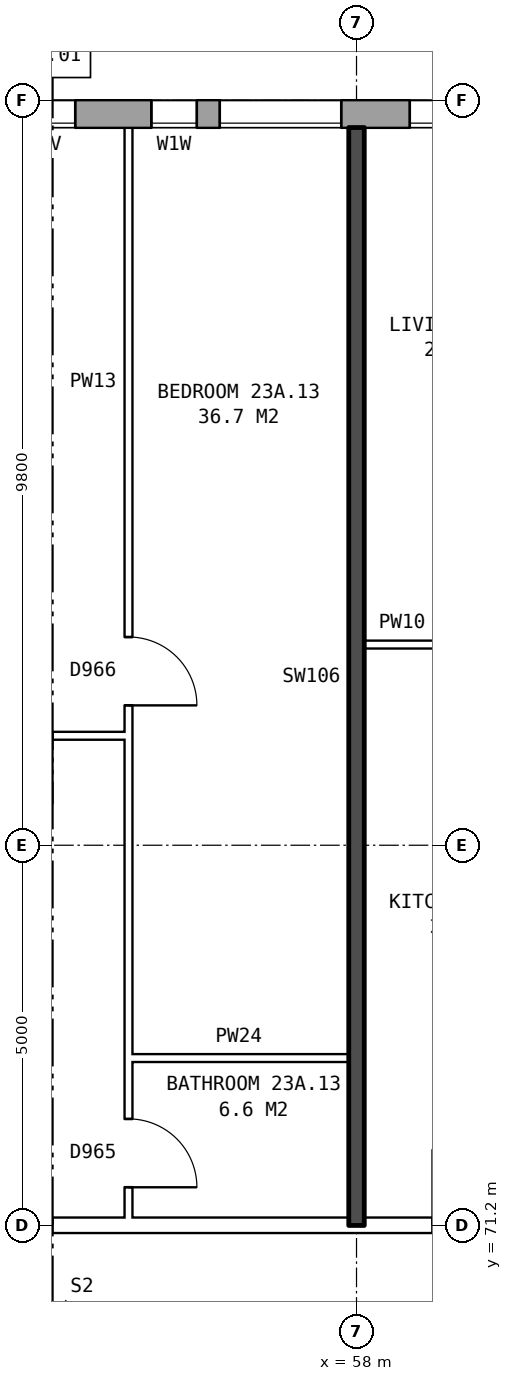
"""IFC4 building model, lengths in metres.
Left out: names, types, materials, properties, quantities, classifications, styles, units other than length and angle.
Written with IfcOpenShell. Run it as: python <this file> out.ifc"""

import sys

from ifc_helpers import new_model, si_unit, direction, frame, frame_2d, origin, place, context, subcontext, project, spatial, rectangle, extrude, element, fill, save


model = new_model("IFC4")
c1 = context("Model", 3, precision=1e-05, world=origin(), true_north=direction((0.0, 1.0)))
c2 = subcontext(c1, "Body", "Model", "MODEL_VIEW")
j1 = project(units=[si_unit("LENGTHUNIT", "METRE"), si_unit("PLANEANGLEUNIT", "RADIAN")], contexts=[c1])
p1 = place(None, origin())
s1 = spatial("IfcSite", under=j1, at=p1, CompositionType="ELEMENT")
p2 = place(p1, origin())
s2 = spatial("IfcBuilding", under=s1, at=p2, CompositionType="ELEMENT")
p3 = place(p2, frame((0.0, 0.0, 84.0)))
s3 = spatial("IfcBuildingStorey", under=s2, at=p3, CompositionType="ELEMENT", Elevation=84.0)
p4 = place(p3, frame((72.925, 85.82, 0.0), z_axis=(0.0, 0.0, 1.0), x_axis=(-1.0, 0.0, 0.0)))
e1 = element("IfcWall", 1, at=p4, inside=s3, PredefinedType="STANDARD", context=c2, shape_type="SweptSolid", body=[
    extrude(rectangle(XDim=46.601, YDim=0.36, at=frame_2d((23.3, 0.0))), origin(), (0.0, 0.0, 1.0), 2.85),
])
p5 = place(p4, frame((0.625, 0.0, 0.8)))
e2 = element("IfcOpeningElement", 2, at=p5, cuts=e1, PredefinedType="OPENING", context=c2, shape_type="SweptSolid", body=[
    extrude(rectangle(XDim=1.6, YDim=1.8, at=frame_2d((0.8, 0.9))), frame((0.0, 0.19, 0.0), z_axis=(0.0, -1.0, 0.0), x_axis=(1.0, 0.0, 0.0)), (0.0, 0.0, 1.0), 0.38),
])
p6 = place(p4, frame((3.625, 0.0, 0.8)))
e3 = element("IfcOpeningElement", 3, at=p6, cuts=e1, PredefinedType="OPENING", context=c2, shape_type="SweptSolid", body=[
    extrude(rectangle(XDim=1.6, YDim=1.8, at=frame_2d((0.8, 0.9))), frame((0.0, 0.19, 0.0), z_axis=(0.0, -1.0, 0.0), x_axis=(1.0, 0.0, 0.0)), (0.0, 0.0, 1.0), 0.38),
])
p7 = place(p4, frame((6.625, 0.0, 0.8)))
e4 = element("IfcOpeningElement", 4, at=p7, cuts=e1, PredefinedType="OPENING", context=c2, shape_type="SweptSolid", body=[
    extrude(rectangle(XDim=1.6, YDim=1.8, at=frame_2d((0.8, 0.9))), frame((0.0, 0.19, 0.0), z_axis=(0.0, -1.0, 0.0), x_axis=(1.0, 0.0, 0.0)), (0.0, 0.0, 1.0), 0.38),
])
p8 = place(p4, frame((9.625, 0.0, 0.8)))
e5 = element("IfcOpeningElement", 5, at=p8, cuts=e1, PredefinedType="OPENING", context=c2, shape_type="SweptSolid", body=[
    extrude(rectangle(XDim=1.6, YDim=1.8, at=frame_2d((0.8, 0.9))), frame((0.0, 0.19, 0.0), z_axis=(0.0, -1.0, 0.0), x_axis=(1.0, 0.0, 0.0)), (0.0, 0.0, 1.0), 0.38),
])
p9 = place(p4, frame((12.625, 0.0, 0.8)))
e6 = element("IfcOpeningElement", 6, at=p9, cuts=e1, PredefinedType="OPENING", context=c2, shape_type="SweptSolid", body=[
    extrude(rectangle(XDim=1.6, YDim=1.8, at=frame_2d((0.8, 0.9))), frame((0.0, 0.19, 0.0), z_axis=(0.0, -1.0, 0.0), x_axis=(1.0, 0.0, 0.0)), (0.0, 0.0, 1.0), 0.38),
])
p10 = place(p4, frame((15.125, 0.0, 0.8)))
e7 = element("IfcOpeningElement", 7, at=p10, cuts=e1, PredefinedType="OPENING", context=c2, shape_type="SweptSolid", body=[
    extrude(rectangle(XDim=1.6, YDim=1.8, at=frame_2d((0.8, 0.9))), frame((0.0, 0.19, 0.0), z_axis=(0.0, -1.0, 0.0), x_axis=(1.0, 0.0, 0.0)), (0.0, 0.0, 1.0), 0.38),
])
p11 = place(p4, frame((18.625, 0.0, 0.35)))
e8 = element("IfcOpeningElement", 8, at=p11, cuts=e1, PredefinedType="OPENING", context=c2, shape_type="SweptSolid", body=[
    extrude(rectangle(XDim=0.8, YDim=0.9, at=frame_2d((0.4, 0.45))), frame((0.0, 0.19, 0.0), z_axis=(0.0, -1.0, 0.0), x_axis=(1.0, 0.0, 0.0)), (0.0, 0.0, 1.0), 0.38),
])
p12 = place(p4, frame((21.625, 0.0, 0.8)))
e9 = element("IfcOpeningElement", 9, at=p12, cuts=e1, PredefinedType="OPENING", context=c2, shape_type="SweptSolid", body=[
    extrude(rectangle(XDim=1.6, YDim=1.8, at=frame_2d((0.8, 0.9))), frame((0.0, 0.19, 0.0), z_axis=(0.0, -1.0, 0.0), x_axis=(1.0, 0.0, 0.0)), (0.0, 0.0, 1.0), 0.38),
])
p13 = place(p4, frame((24.625, 0.0, 0.8)))
e10 = element("IfcOpeningElement", 10, at=p13, cuts=e1, PredefinedType="OPENING", context=c2, shape_type="SweptSolid", body=[
    extrude(rectangle(XDim=1.6, YDim=1.8, at=frame_2d((0.8, 0.9))), frame((0.0, 0.19, 0.0), z_axis=(0.0, -1.0, 0.0), x_axis=(1.0, 0.0, 0.0)), (0.0, 0.0, 1.0), 0.38),
])
p14 = place(p4, frame((29.075, 0.0, 1.4)))
e11 = element("IfcOpeningElement", 11, at=p14, cuts=e1, PredefinedType="OPENING", context=c2, shape_type="SweptSolid", body=[
    extrude(rectangle(XDim=1.2, YDim=1.2, at=frame_2d((0.6, 0.6))), frame((0.0, 0.19, 0.0), z_axis=(0.0, -1.0, 0.0), x_axis=(1.0, 0.0, 0.0)), (0.0, 0.0, 1.0), 0.38),
])
p15 = place(p4, frame((30.625, 0.0, 0.8)))
e12 = element("IfcOpeningElement", 12, at=p15, cuts=e1, PredefinedType="OPENING", context=c2, shape_type="SweptSolid", body=[
    extrude(rectangle(XDim=1.6, YDim=1.8, at=frame_2d((0.8, 0.9))), frame((0.0, 0.19, 0.0), z_axis=(0.0, -1.0, 0.0), x_axis=(1.0, 0.0, 0.0)), (0.0, 0.0, 1.0), 0.38),
])
p16 = place(p4, frame((33.625, 0.0, 0.8)))
e13 = element("IfcOpeningElement", 13, at=p16, cuts=e1, PredefinedType="OPENING", context=c2, shape_type="SweptSolid", body=[
    extrude(rectangle(XDim=1.6, YDim=1.8, at=frame_2d((0.8, 0.9))), frame((0.0, 0.19, 0.0), z_axis=(0.0, -1.0, 0.0), x_axis=(1.0, 0.0, 0.0)), (0.0, 0.0, 1.0), 0.38),
])
p17 = place(p4, frame((36.625, 0.0, 0.8)))
e14 = element("IfcOpeningElement", 14, at=p17, cuts=e1, PredefinedType="OPENING", context=c2, shape_type="SweptSolid", body=[
    extrude(rectangle(XDim=1.6, YDim=1.8, at=frame_2d((0.8, 0.9))), frame((0.0, 0.19, 0.0), z_axis=(0.0, -1.0, 0.0), x_axis=(1.0, 0.0, 0.0)), (0.0, 0.0, 1.0), 0.38),
])
p18 = place(p4, frame((39.625, 0.0, 0.8)))
e15 = element("IfcOpeningElement", 15, at=p18, cuts=e1, PredefinedType="OPENING", context=c2, shape_type="SweptSolid", body=[
    extrude(rectangle(XDim=1.6, YDim=1.8, at=frame_2d((0.8, 0.9))), frame((0.0, 0.19, 0.0), z_axis=(0.0, -1.0, 0.0), x_axis=(1.0, 0.0, 0.0)), (0.0, 0.0, 1.0), 0.38),
])
p19 = place(p4, frame((42.625, 0.0, 0.8)))
e16 = element("IfcOpeningElement", 16, at=p19, cuts=e1, PredefinedType="OPENING", context=c2, shape_type="SweptSolid", body=[
    extrude(rectangle(XDim=1.6, YDim=1.8, at=frame_2d((0.8, 0.9))), frame((0.0, 0.19, 0.0), z_axis=(0.0, -1.0, 0.0), x_axis=(1.0, 0.0, 0.0)), (0.0, 0.0, 1.0), 0.38),
])
p20 = place(p4, frame((17.025, 0.0, 1.5)))
e17 = element("IfcOpeningElement", 17, at=p20, cuts=e1, PredefinedType="OPENING", context=c2, shape_type="SweptSolid", body=[
    extrude(rectangle(XDim=0.6, YDim=0.9, at=frame_2d((0.3, 0.45))), frame((0.0, 0.19, 0.0), z_axis=(0.0, -1.0, 0.0), x_axis=(1.0, 0.0, 0.0)), (0.0, 0.0, 1.0), 0.38),
])
p21 = place(p4, frame((19.725, 0.0, 0.35)))
e18 = element("IfcOpeningElement", 18, at=p21, cuts=e1, PredefinedType="OPENING", context=c2, shape_type="SweptSolid", body=[
    extrude(rectangle(XDim=1.0, YDim=1.8, at=frame_2d((0.5, 0.9))), frame((0.0, 0.19, 0.0), z_axis=(0.0, -1.0, 0.0), x_axis=(1.0, 0.0, 0.0)), (0.0, 0.0, 1.0), 0.38),
])
p22 = place(p3, frame((44.36, 71.2, 0.0), z_axis=(0.0, 0.0, 1.0), x_axis=(1.0, 0.0, 0.0)))
e19 = element("IfcWall", 19, at=p22, inside=s3, PredefinedType="PARTITIONING", context=c2, shape_type="SweptSolid", body=[
    extrude(rectangle(XDim=19.28, YDim=0.2, at=frame_2d((9.64, 0.0))), origin(), (0.0, 0.0, 1.0), 2.85),
])
p23 = place(p22, frame((14.64, 0.0, 0.0)))
e20 = element("IfcOpeningElement", 20, at=p23, cuts=e19, PredefinedType="OPENING", context=c2, shape_type="SweptSolid", body=[
    extrude(rectangle(XDim=1.0, YDim=2.1, at=frame_2d((0.5, 1.05))), frame((0.0, 0.11, 0.0), z_axis=(0.0, -1.0, 0.0), x_axis=(1.0, 0.0, 0.0)), (0.0, 0.0, 1.0), 0.22),
])
p24 = place(p22, frame((8.64, 0.0, 0.0)))
e21 = element("IfcOpeningElement", 21, at=p24, cuts=e19, PredefinedType="OPENING", context=c2, shape_type="SweptSolid", body=[
    extrude(rectangle(XDim=1.0, YDim=2.1, at=frame_2d((0.5, 1.05))), frame((0.0, 0.11, 0.0), z_axis=(0.0, -1.0, 0.0), x_axis=(1.0, 0.0, 0.0)), (0.0, 0.0, 1.0), 0.22),
])
p25 = place(p22, frame((2.64, 0.0, 0.0)))
e22 = element("IfcOpeningElement", 22, at=p25, cuts=e19, PredefinedType="OPENING", context=c2, shape_type="SweptSolid", body=[
    extrude(rectangle(XDim=1.0, YDim=2.1, at=frame_2d((0.5, 1.05))), frame((0.0, 0.11, 0.0), z_axis=(0.0, -1.0, 0.0), x_axis=(1.0, 0.0, 0.0)), (0.0, 0.0, 1.0), 0.22),
])
p26 = place(p3, frame((55.0, 73.4, 0.0), z_axis=(0.0, 0.0, 1.0), x_axis=(1.0, 0.0, 0.0)))
e23 = element("IfcWall", 23, at=p26, inside=s3, PredefinedType="PARTITIONING", context=c2, shape_type="SweptSolid", body=[
    extrude(rectangle(XDim=2.9, YDim=0.1, at=frame_2d((1.45, 0.0))), origin(), (0.0, 0.0, 1.0), 2.85),
])
p27 = place(p3, frame((52.1, 77.64, 0.0), z_axis=(0.0, 0.0, 1.0), x_axis=(1.0, 0.0, 0.0)))
e24 = element("IfcWall", 24, at=p27, inside=s3, PredefinedType="PARTITIONING", context=c2, shape_type="SweptSolid", body=[
    extrude(rectangle(XDim=2.9, YDim=0.1, at=frame_2d((1.45, 0.0))), origin(), (0.0, 0.0, 1.0), 2.85),
])
p28 = place(p27, frame((1.0, 0.0, 0.0)))
e25 = element("IfcOpeningElement", 25, at=p28, cuts=e24, PredefinedType="OPENING", context=c2, shape_type="SweptSolid", body=[
    extrude(rectangle(XDim=0.9, YDim=2.1, at=frame_2d((0.45, 1.05))), frame((0.0, 0.06, 0.0), z_axis=(0.0, -1.0, 0.0), x_axis=(1.0, 0.0, 0.0)), (0.0, 0.0, 1.0), 0.12),
])
p29 = place(p3, frame((58.1, 78.84, 0.0), z_axis=(0.0, 0.0, 1.0), x_axis=(1.0, 0.0, 0.0)))
e26 = element("IfcWall", 26, at=p29, inside=s3, PredefinedType="PARTITIONING", context=c2, shape_type="SweptSolid", body=[
    extrude(rectangle(XDim=2.9, YDim=0.1, at=frame_2d((1.45, 0.0))), origin(), (0.0, 0.0, 1.0), 2.85),
])
p30 = place(p29, frame((1.0, 0.0, 0.0)))
e27 = element("IfcOpeningElement", 27, at=p30, cuts=e26, PredefinedType="OPENING", context=c2, shape_type="SweptSolid", body=[
    extrude(rectangle(XDim=0.9, YDim=2.1, at=frame_2d((0.45, 1.05))), frame((0.0, 0.06, 0.0), z_axis=(0.0, -1.0, 0.0), x_axis=(1.0, 0.0, 0.0)), (0.0, 0.0, 1.0), 0.12),
])
p31 = place(p3, frame((55.0, 71.3, 0.0), z_axis=(0.0, 0.0, 1.0), x_axis=(0.0, 1.0, 0.0)))
e28 = element("IfcWall", 28, at=p31, inside=s3, PredefinedType="PARTITIONING", context=c2, shape_type="SweptSolid", body=[
    extrude(rectangle(XDim=14.34, YDim=0.1, at=frame_2d((7.17, 0.0))), origin(), (0.0, 0.0, 1.0), 2.85),
])
p32 = place(p31, frame((6.74, 0.0, 0.0)))
e29 = element("IfcOpeningElement", 29, at=p32, cuts=e28, PredefinedType="OPENING", context=c2, shape_type="SweptSolid", body=[
    extrude(rectangle(XDim=0.9, YDim=2.1, at=frame_2d((0.45, 1.05))), frame((0.0, 0.06, 0.0), z_axis=(0.0, -1.0, 0.0), x_axis=(1.0, 0.0, 0.0)), (0.0, 0.0, 1.0), 0.12),
])
p33 = place(p31, frame((0.4, 0.0, 0.0)))
e30 = element("IfcOpeningElement", 30, at=p33, cuts=e28, PredefinedType="OPENING", context=c2, shape_type="SweptSolid", body=[
    extrude(rectangle(XDim=0.9, YDim=2.1, at=frame_2d((0.45, 1.05))), frame((0.0, 0.06, 0.0), z_axis=(0.0, -1.0, 0.0), x_axis=(1.0, 0.0, 0.0)), (0.0, 0.0, 1.0), 0.12),
])
p34 = place(p3, frame((58.0, 71.2, 0.0), z_axis=(0.0, 0.0, 1.0), x_axis=(0.0, 1.0, 0.0)))
e31 = element("IfcWall", 31, at=p34, inside=s3, PredefinedType="SOLIDWALL", context=c2, shape_type="SweptSolid", body=[
    extrude(rectangle(XDim=14.44, YDim=0.2, at=frame_2d((7.22, 0.0))), origin(), (0.0, 0.0, 1.0), 2.85),
])
p35 = place(p9, origin())
e32 = element("IfcWindow", 32, at=p35, inside=s3, PartitioningType="SINGLE_PANEL", PredefinedType="WINDOW", context=c2, shape_type="SweptSolid", body=[
    extrude(rectangle(XDim=1.6, YDim=1.8, at=frame_2d((0.8, 0.9))), frame((0.0, 0.15, 0.0), z_axis=(0.0, -1.0, 0.0), x_axis=(1.0, 0.0, 0.0)), (0.0, 0.0, 1.0), 0.06),
])
fill(e6, e32)
p36 = place(p10, origin())
e33 = element("IfcWindow", 33, at=p36, inside=s3, PartitioningType="SINGLE_PANEL", PredefinedType="WINDOW", context=c2, shape_type="SweptSolid", body=[
    extrude(rectangle(XDim=1.6, YDim=1.8, at=frame_2d((0.8, 0.9))), frame((0.0, 0.15, 0.0), z_axis=(0.0, -1.0, 0.0), x_axis=(1.0, 0.0, 0.0)), (0.0, 0.0, 1.0), 0.06),
])
fill(e7, e33)
p37 = place(p11, origin())
e34 = element("IfcWindow", 34, at=p37, inside=s3, PartitioningType="SINGLE_PANEL", PredefinedType="WINDOW", context=c2, shape_type="SweptSolid", body=[
    extrude(rectangle(XDim=0.8, YDim=0.9, at=frame_2d((0.4, 0.45))), frame((0.0, 0.15, 0.0), z_axis=(0.0, -1.0, 0.0), x_axis=(1.0, 0.0, 0.0)), (0.0, 0.0, 1.0), 0.06),
])
fill(e8, e34)
p38 = place(p32, frame((0.9, 0.0, 0.0), z_axis=(0.0, 0.0, 1.0), x_axis=(-1.0, 0.0, 0.0)))
e35 = element("IfcDoor", 35, at=p38, inside=s3, OperationType="SINGLE_SWING_RIGHT", PredefinedType="DOOR", context=c2, shape_type="SweptSolid", body=[
    extrude(rectangle(XDim=0.9, YDim=2.1, at=frame_2d((0.45, 1.05))), frame((0.0, 0.025, 0.0), z_axis=(0.0, -1.0, 0.0), x_axis=(1.0, 0.0, 0.0)), (0.0, 0.0, 1.0), 0.05),
])
fill(e29, e35)
p39 = place(p33, frame((0.9, 0.0, 0.0), z_axis=(0.0, 0.0, 1.0), x_axis=(-1.0, 0.0, 0.0)))
e36 = element("IfcDoor", 36, at=p39, inside=s3, OperationType="SINGLE_SWING_RIGHT", PredefinedType="DOOR", context=c2, shape_type="SweptSolid", body=[
    extrude(rectangle(XDim=0.9, YDim=2.1, at=frame_2d((0.45, 1.05))), frame((0.0, 0.025, 0.0), z_axis=(0.0, -1.0, 0.0), x_axis=(1.0, 0.0, 0.0)), (0.0, 0.0, 1.0), 0.05),
])
fill(e30, e36)
p40 = place(p20, origin())
e37 = element("IfcWindow", 37, at=p40, inside=s3, PartitioningType="SINGLE_PANEL", PredefinedType="WINDOW", context=c2, shape_type="SweptSolid", body=[
    extrude(rectangle(XDim=0.6, YDim=0.9, at=frame_2d((0.3, 0.45))), frame((0.0, 0.15, 0.0), z_axis=(0.0, -1.0, 0.0), x_axis=(1.0, 0.0, 0.0)), (0.0, 0.0, 1.0), 0.06),
])
fill(e17, e37)
save(model, sys.argv[1])
